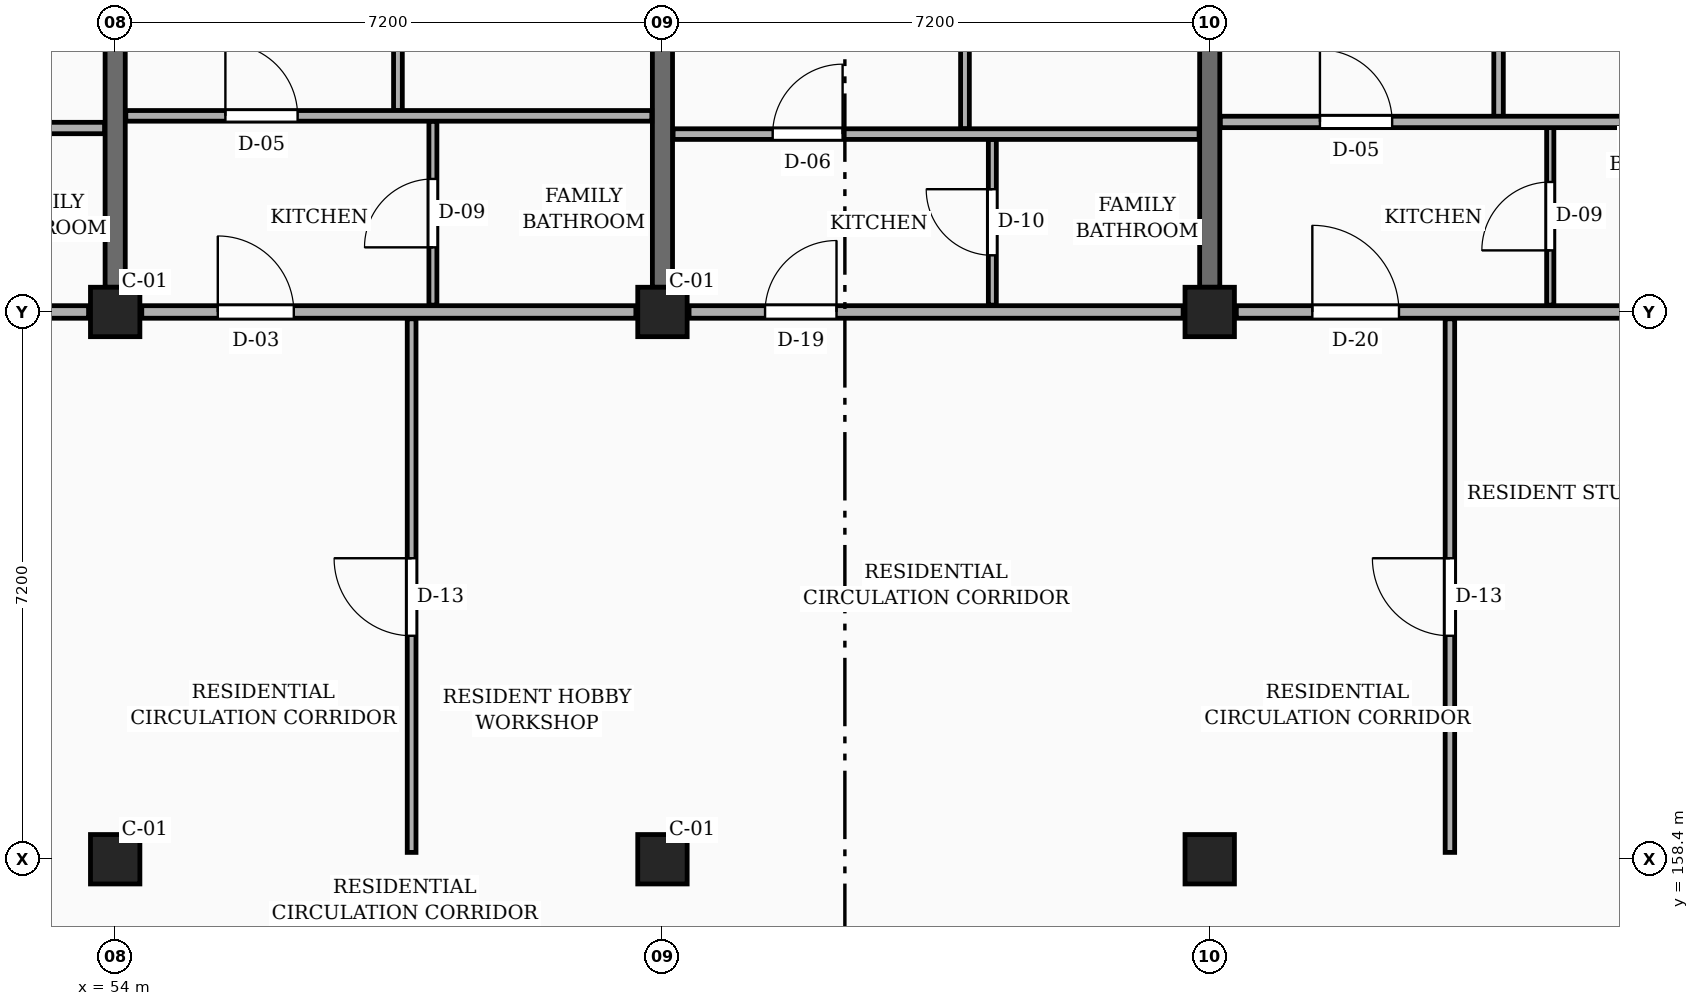
"""IFC4 building model, lengths in metres.
Left out: names, types, materials, properties, quantities, classifications, styles, units other than length and angle.
Written with IfcOpenShell. Run it as: python <this file> out.ifc"""

import sys

from ifc_helpers import new_model, si_unit, direction, frame, frame_2d, origin, origin_2d, place, context, subcontext, project, spatial, rectangle, extrude, element, fill, save


model = new_model("IFC4")
c1 = context("Model", 3, precision=1e-05, world=origin(), true_north=direction((0.0, 1.0)))
c2 = subcontext(c1, "Body", "Model", "MODEL_VIEW")
j1 = project(units=[si_unit("LENGTHUNIT", "METRE"), si_unit("PLANEANGLEUNIT", "RADIAN")], contexts=[c1])
p1 = place(None, origin())
s1 = spatial("IfcSite", under=j1, at=p1, CompositionType="ELEMENT")
p2 = place(p1, origin())
s2 = spatial("IfcBuilding", under=s1, at=p2, CompositionType="ELEMENT")
p3 = place(p2, frame((0.0, 0.0, 4.5)))
s3 = spatial("IfcBuildingStorey", under=s2, at=p3, CompositionType="ELEMENT", Elevation=4.5)
for number, where, z_axis, x_axis in (
    (1, (54.0, 158.4, 0.0), (0.0, 0.0, 1.0), (1.0, 0.0, 0.0)),
    (2, (54.0, 165.6, 0.0), (0.0, 0.0, 1.0), (1.0, 0.0, 0.0)),
    (3, (61.2, 158.4, 0.0), (0.0, 0.0, 1.0), (1.0, 0.0, 0.0)),
    (4, (61.2, 165.6, 0.0), (0.0, 0.0, 1.0), (1.0, 0.0, 0.0)),
    (5, (68.4, 158.4, 0.0), (0.0, 0.0, 1.0), (1.0, 0.0, 0.0)),
    (6, (68.4, 165.6, 0.0), (0.0, 0.0, 1.0), (1.0, 0.0, 0.0)),
):
    element("IfcColumn", number, at=place(p3, frame(where, z_axis=z_axis, x_axis=x_axis)), inside=s3, PredefinedType="COLUMN", context=c2, shape_type="SweptSolid", body=[
        extrude(rectangle(XDim=0.65, YDim=0.65, at=origin_2d()), origin(), (0.0, 0.0, 1.0), 3.15),
    ])
for number, where, z_axis, x_axis in (
    (7, (54.0, 165.925, 0.0), (0.0, 0.0, 1.0), (0.0, 1.0, 0.0)),
    (8, (61.2, 165.925, 0.0), (0.0, 0.0, 1.0), (0.0, 1.0, 0.0)),
    (9, (68.4, 165.925, 0.0), (0.0, 0.0, 1.0), (0.0, 1.0, 0.0)),
):
    element("IfcWall", number, at=place(p3, frame(where, z_axis=z_axis, x_axis=x_axis)), inside=s3, PredefinedType="SOLIDWALL", context=c2, shape_type="SweptSolid", body=[
        extrude(rectangle(XDim=6.575, YDim=0.265, at=frame_2d((3.288, 0.0))), origin(), (0.0, 0.0, 1.0), 2.185),
    ])
p4 = place(p3, frame((47.15, 165.6, 0.0), z_axis=(0.0, 0.0, 1.0), x_axis=(1.0, 0.0, 0.0)))
e10 = element("IfcWall", 10, at=p4, inside=s3, PredefinedType="PARTITIONING", context=c2, shape_type="SweptSolid", body=[
    extrude(rectangle(XDim=6.5, YDim=0.165, at=frame_2d((3.25, 0.0))), origin(), (0.0, 0.0, 1.0), 2.185),
])
p5 = place(p4, frame((1.0, 0.0, 0.0)))
e11 = element("IfcOpeningElement", 11, at=p5, cuts=e10, PredefinedType="OPENING", context=c2, shape_type="SweptSolid", body=[
    extrude(rectangle(XDim=1.14, YDim=2.18, at=frame_2d((0.57, 1.09))), frame((0.0, 0.093, 0.0), z_axis=(0.0, -1.0, 0.0), x_axis=(1.0, 0.0, 0.0)), (0.0, 0.0, 1.0), 0.185),
])
p6 = place(p3, frame((54.35, 165.6, 0.0), z_axis=(0.0, 0.0, 1.0), x_axis=(1.0, 0.0, 0.0)))
e12 = element("IfcWall", 12, at=p6, inside=s3, PredefinedType="PARTITIONING", context=c2, shape_type="SweptSolid", body=[
    extrude(rectangle(XDim=6.5, YDim=0.165, at=frame_2d((3.25, 0.0))), origin(), (0.0, 0.0, 1.0), 2.185),
])
p7 = place(p6, frame((1.0, 0.0, 0.0)))
e13 = element("IfcOpeningElement", 13, at=p7, cuts=e12, PredefinedType="OPENING", context=c2, shape_type="SweptSolid", body=[
    extrude(rectangle(XDim=1.0, YDim=2.15, at=frame_2d((0.5, 1.075))), frame((0.0, 0.093, 0.0), z_axis=(0.0, -1.0, 0.0), x_axis=(1.0, 0.0, 0.0)), (0.0, 0.0, 1.0), 0.185),
])
p8 = place(p3, frame((61.55, 165.6, 0.0), z_axis=(0.0, 0.0, 1.0), x_axis=(1.0, 0.0, 0.0)))
e14 = element("IfcWall", 14, at=p8, inside=s3, PredefinedType="PARTITIONING", context=c2, shape_type="SweptSolid", body=[
    extrude(rectangle(XDim=6.5, YDim=0.165, at=frame_2d((3.25, 0.0))), origin(), (0.0, 0.0, 1.0), 2.185),
])
p9 = place(p8, frame((1.0, 0.0, 0.0)))
e15 = element("IfcOpeningElement", 15, at=p9, cuts=e14, PredefinedType="OPENING", context=c2, shape_type="SweptSolid", body=[
    extrude(rectangle(XDim=0.94, YDim=2.12, at=frame_2d((0.47, 1.06))), frame((0.0, 0.093, 0.0), z_axis=(0.0, -1.0, 0.0), x_axis=(1.0, 0.0, 0.0)), (0.0, 0.0, 1.0), 0.185),
])
p10 = place(p3, frame((68.75, 165.6, 0.0), z_axis=(0.0, 0.0, 1.0), x_axis=(1.0, 0.0, 0.0)))
e16 = element("IfcWall", 16, at=p10, inside=s3, PredefinedType="PARTITIONING", context=c2, shape_type="SweptSolid", body=[
    extrude(rectangle(XDim=6.5, YDim=0.165, at=frame_2d((3.25, 0.0))), origin(), (0.0, 0.0, 1.0), 2.185),
])
p11 = place(p10, frame((1.0, 0.0, 0.0)))
e17 = element("IfcOpeningElement", 17, at=p11, cuts=e16, PredefinedType="OPENING", context=c2, shape_type="SweptSolid", body=[
    extrude(rectangle(XDim=1.14, YDim=2.18, at=frame_2d((0.57, 1.09))), frame((0.0, 0.093, 0.0), z_axis=(0.0, -1.0, 0.0), x_axis=(1.0, 0.0, 0.0)), (0.0, 0.0, 1.0), 0.185),
])
p12 = place(p3, frame((46.94, 168.02, 0.0), z_axis=(0.0, 0.0, 1.0), x_axis=(1.0, 0.0, 0.0)))
e18 = element("IfcWall", 18, at=p12, inside=s3, PredefinedType="PARTITIONING", context=c2, shape_type="SweptSolid", body=[
    extrude(rectangle(XDim=6.92, YDim=0.15, at=frame_2d((3.46, 0.0))), origin(), (0.0, 0.0, 1.0), 2.32),
])
p13 = place(p12, frame((1.31, 0.0, 0.0)))
e19 = element("IfcOpeningElement", 19, at=p13, cuts=e18, PredefinedType="OPENING", context=c2, shape_type="SweptSolid", body=[
    extrude(rectangle(XDim=0.92, YDim=2.1, at=frame_2d((0.46, 1.05))), frame((0.0, 0.085, 0.0), z_axis=(0.0, -1.0, 0.0), x_axis=(1.0, 0.0, 0.0)), (0.0, 0.0, 1.0), 0.17),
])
p14 = place(p3, frame((57.9, 158.49, 0.0), z_axis=(0.0, 0.0, 1.0), x_axis=(0.0, 1.0, 0.0)))
e20 = element("IfcWall", 20, at=p14, inside=s3, PredefinedType="PARTITIONING", context=c2, shape_type="SweptSolid", body=[
    extrude(rectangle(XDim=7.02, YDim=0.115, at=frame_2d((3.51, 0.0))), origin(), (0.0, 0.0, 1.0), 2.32),
])
p15 = place(p14, frame((2.85, 0.0, 0.0)))
e21 = element("IfcOpeningElement", 21, at=p15, cuts=e20, PredefinedType="OPENING", context=c2, shape_type="SweptSolid", body=[
    extrude(rectangle(XDim=1.02, YDim=2.15, at=frame_2d((0.51, 1.075))), frame((0.0, 0.067, 0.0), z_axis=(0.0, -1.0, 0.0), x_axis=(1.0, 0.0, 0.0)), (0.0, 0.0, 1.0), 0.135),
])
p16 = place(p3, frame((57.72, 168.25, 0.0), z_axis=(0.0, 0.0, 1.0), x_axis=(0.0, 1.0, 0.0)))
e22 = element("IfcWall", 22, at=p16, inside=s3, PredefinedType="PARTITIONING", context=c2, shape_type="SweptSolid", body=[
    extrude(rectangle(XDim=4.375, YDim=0.115, at=frame_2d((2.188, 0.0))), origin(), (0.0, 0.0, 1.0), 2.32),
])
p17 = place(p16, frame((1.738, 0.0, 0.0)))
e23 = element("IfcOpeningElement", 23, at=p17, cuts=e22, PredefinedType="OPENING", context=c2, shape_type="SweptSolid", body=[
    extrude(rectangle(XDim=0.9, YDim=2.1, at=frame_2d((0.45, 1.05))), frame((0.0, 0.067, 0.0), z_axis=(0.0, -1.0, 0.0), x_axis=(1.0, 0.0, 0.0)), (0.0, 0.0, 1.0), 0.135),
])
p18 = place(p3, frame((58.18, 165.69, 0.0), z_axis=(0.0, 0.0, 1.0), x_axis=(0.0, 1.0, 0.0)))
e24 = element("IfcWall", 24, at=p18, inside=s3, PredefinedType="PARTITIONING", context=c2, shape_type="SweptSolid", body=[
    extrude(rectangle(XDim=2.42, YDim=0.105, at=frame_2d((1.21, 0.0))), origin(), (0.0, 0.0, 1.0), 2.32),
])
p19 = place(p18, frame((0.76, 0.0, 0.0)))
e25 = element("IfcOpeningElement", 25, at=p19, cuts=e24, PredefinedType="OPENING", context=c2, shape_type="SweptSolid", body=[
    extrude(rectangle(XDim=0.9, YDim=2.05, at=frame_2d((0.45, 1.025))), frame((0.0, 0.062, 0.0), z_axis=(0.0, -1.0, 0.0), x_axis=(1.0, 0.0, 0.0)), (0.0, 0.0, 1.0), 0.125),
])
p20 = place(p3, frame((54.14, 168.18, 0.0), z_axis=(0.0, 0.0, 1.0), x_axis=(1.0, 0.0, 0.0)))
e26 = element("IfcWall", 26, at=p20, inside=s3, PredefinedType="PARTITIONING", context=c2, shape_type="SweptSolid", body=[
    extrude(rectangle(XDim=6.92, YDim=0.14, at=frame_2d((3.46, 0.0))), origin(), (0.0, 0.0, 1.0), 2.32),
])
p21 = place(p20, frame((1.31, 0.0, 0.0)))
e27 = element("IfcOpeningElement", 27, at=p21, cuts=e26, PredefinedType="OPENING", context=c2, shape_type="SweptSolid", body=[
    extrude(rectangle(XDim=0.95, YDim=2.1, at=frame_2d((0.475, 1.05))), frame((0.0, 0.08, 0.0), z_axis=(0.0, -1.0, 0.0), x_axis=(1.0, 0.0, 0.0)), (0.0, 0.0, 1.0), 0.16),
])
p22 = place(p3, frame((65.18, 168.01, 0.0), z_axis=(0.0, 0.0, 1.0), x_axis=(0.0, 1.0, 0.0)))
e28 = element("IfcWall", 28, at=p22, inside=s3, PredefinedType="PARTITIONING", context=c2, shape_type="SweptSolid", body=[
    extrude(rectangle(XDim=4.615, YDim=0.115, at=frame_2d((2.308, 0.0))), origin(), (0.0, 0.0, 1.0), 2.32),
])
p23 = place(p22, frame((1.867, 0.0, 0.0)))
e29 = element("IfcOpeningElement", 29, at=p23, cuts=e28, PredefinedType="OPENING", context=c2, shape_type="SweptSolid", body=[
    extrude(rectangle(XDim=0.88, YDim=2.08, at=frame_2d((0.44, 1.04))), frame((0.0, 0.067, 0.0), z_axis=(0.0, -1.0, 0.0), x_axis=(1.0, 0.0, 0.0)), (0.0, 0.0, 1.0), 0.135),
])
p24 = place(p3, frame((65.54, 165.69, 0.0), z_axis=(0.0, 0.0, 1.0), x_axis=(0.0, 1.0, 0.0)))
e30 = element("IfcWall", 30, at=p24, inside=s3, PredefinedType="PARTITIONING", context=c2, shape_type="SweptSolid", body=[
    extrude(rectangle(XDim=2.18, YDim=0.105, at=frame_2d((1.09, 0.0))), origin(), (0.0, 0.0, 1.0), 2.32),
])
p25 = place(p24, frame((0.655, 0.0, 0.0)))
e31 = element("IfcOpeningElement", 31, at=p25, cuts=e30, PredefinedType="OPENING", context=c2, shape_type="SweptSolid", body=[
    extrude(rectangle(XDim=0.87, YDim=2.05, at=frame_2d((0.435, 1.025))), frame((0.0, 0.062, 0.0), z_axis=(0.0, -1.0, 0.0), x_axis=(1.0, 0.0, 0.0)), (0.0, 0.0, 1.0), 0.125),
])
p26 = place(p3, frame((61.34, 167.94, 0.0), z_axis=(0.0, 0.0, 1.0), x_axis=(1.0, 0.0, 0.0)))
e32 = element("IfcWall", 32, at=p26, inside=s3, PredefinedType="PARTITIONING", context=c2, shape_type="SweptSolid", body=[
    extrude(rectangle(XDim=6.92, YDim=0.14, at=frame_2d((3.46, 0.0))), origin(), (0.0, 0.0, 1.0), 2.32),
])
p27 = place(p26, frame((1.31, 0.0, 0.0)))
e33 = element("IfcOpeningElement", 33, at=p27, cuts=e32, PredefinedType="OPENING", context=c2, shape_type="SweptSolid", body=[
    extrude(rectangle(XDim=0.92, YDim=2.1, at=frame_2d((0.46, 1.05))), frame((0.0, 0.08, 0.0), z_axis=(0.0, -1.0, 0.0), x_axis=(1.0, 0.0, 0.0)), (0.0, 0.0, 1.0), 0.16),
])
p28 = place(p3, frame((71.56, 158.49, 0.0), z_axis=(0.0, 0.0, 1.0), x_axis=(0.0, 1.0, 0.0)))
e34 = element("IfcWall", 34, at=p28, inside=s3, PredefinedType="PARTITIONING", context=c2, shape_type="SweptSolid", body=[
    extrude(rectangle(XDim=7.02, YDim=0.125, at=frame_2d((3.51, 0.0))), origin(), (0.0, 0.0, 1.0), 2.32),
])
p29 = place(p28, frame((2.85, 0.0, 0.0)))
e35 = element("IfcOpeningElement", 35, at=p29, cuts=e34, PredefinedType="OPENING", context=c2, shape_type="SweptSolid", body=[
    extrude(rectangle(XDim=1.02, YDim=2.15, at=frame_2d((0.51, 1.075))), frame((0.0, 0.073, 0.0), z_axis=(0.0, -1.0, 0.0), x_axis=(1.0, 0.0, 0.0)), (0.0, 0.0, 1.0), 0.145),
])
p30 = place(p3, frame((72.2, 168.17, 0.0), z_axis=(0.0, 0.0, 1.0), x_axis=(0.0, 1.0, 0.0)))
e36 = element("IfcWall", 36, at=p30, inside=s3, PredefinedType="PARTITIONING", context=c2, shape_type="SweptSolid", body=[
    extrude(rectangle(XDim=4.455, YDim=0.125, at=frame_2d((2.228, 0.0))), origin(), (0.0, 0.0, 1.0), 2.32),
])
p31 = place(p30, frame((1.778, 0.0, 0.0)))
e37 = element("IfcOpeningElement", 37, at=p31, cuts=e36, PredefinedType="OPENING", context=c2, shape_type="SweptSolid", body=[
    extrude(rectangle(XDim=0.9, YDim=2.1, at=frame_2d((0.45, 1.05))), frame((0.0, 0.073, 0.0), z_axis=(0.0, -1.0, 0.0), x_axis=(1.0, 0.0, 0.0)), (0.0, 0.0, 1.0), 0.145),
])
p32 = place(p3, frame((72.88, 165.69, 0.0), z_axis=(0.0, 0.0, 1.0), x_axis=(0.0, 1.0, 0.0)))
e38 = element("IfcWall", 38, at=p32, inside=s3, PredefinedType="PARTITIONING", context=c2, shape_type="SweptSolid", body=[
    extrude(rectangle(XDim=2.34, YDim=0.095, at=frame_2d((1.17, 0.0))), origin(), (0.0, 0.0, 1.0), 2.32),
])
p33 = place(p32, frame((0.72, 0.0, 0.0)))
e39 = element("IfcOpeningElement", 39, at=p33, cuts=e38, PredefinedType="OPENING", context=c2, shape_type="SweptSolid", body=[
    extrude(rectangle(XDim=0.9, YDim=2.05, at=frame_2d((0.45, 1.025))), frame((0.0, 0.058, 0.0), z_axis=(0.0, -1.0, 0.0), x_axis=(1.0, 0.0, 0.0)), (0.0, 0.0, 1.0), 0.115),
])
p34 = place(p3, frame((68.54, 168.1, 0.0), z_axis=(0.0, 0.0, 1.0), x_axis=(1.0, 0.0, 0.0)))
e40 = element("IfcWall", 40, at=p34, inside=s3, PredefinedType="PARTITIONING", context=c2, shape_type="SweptSolid", body=[
    extrude(rectangle(XDim=6.885, YDim=0.15, at=frame_2d((3.442, 0.0))), origin(), (0.0, 0.0, 1.0), 2.32),
])
p35 = place(p34, frame((1.31, 0.0, 0.0)))
e41 = element("IfcOpeningElement", 41, at=p35, cuts=e40, PredefinedType="OPENING", context=c2, shape_type="SweptSolid", body=[
    extrude(rectangle(XDim=0.95, YDim=2.1, at=frame_2d((0.475, 1.05))), frame((0.0, 0.085, 0.0), z_axis=(0.0, -1.0, 0.0), x_axis=(1.0, 0.0, 0.0)), (0.0, 0.0, 1.0), 0.17),
])
p36 = place(p7, origin())
e42 = element("IfcDoor", 42, at=p36, inside=s3, OperationType="SINGLE_SWING_LEFT", PredefinedType="DOOR", context=c2, shape_type="SweptSolid", body=[
    extrude(rectangle(XDim=1.0, YDim=2.15, at=frame_2d((0.5, 1.075))), frame((0.0, 0.025, 0.0), z_axis=(0.0, -1.0, 0.0), x_axis=(1.0, 0.0, 0.0)), (0.0, 0.0, 1.0), 0.05),
])
fill(e13, e42)
p37 = place(p9, origin())
e43 = element("IfcDoor", 43, at=p37, inside=s3, OperationType="SINGLE_SWING_RIGHT", PredefinedType="DOOR", context=c2, shape_type="SweptSolid", body=[
    extrude(rectangle(XDim=0.94, YDim=2.12, at=frame_2d((0.47, 1.06))), frame((0.0, 0.025, 0.0), z_axis=(0.0, -1.0, 0.0), x_axis=(1.0, 0.0, 0.0)), (0.0, 0.0, 1.0), 0.05),
])
fill(e15, e43)
p38 = place(p11, origin())
e44 = element("IfcDoor", 44, at=p38, inside=s3, OperationType="SINGLE_SWING_LEFT", PredefinedType="DOOR", context=c2, shape_type="SweptSolid", body=[
    extrude(rectangle(XDim=1.14, YDim=2.18, at=frame_2d((0.57, 1.09))), frame((0.0, 0.025, 0.0), z_axis=(0.0, -1.0, 0.0), x_axis=(1.0, 0.0, 0.0)), (0.0, 0.0, 1.0), 0.05),
])
fill(e17, e44)
p39 = place(p15, origin())
e45 = element("IfcDoor", 45, at=p39, inside=s3, OperationType="SINGLE_SWING_RIGHT", PredefinedType="DOOR", context=c2, shape_type="SweptSolid", body=[
    extrude(rectangle(XDim=1.02, YDim=2.15, at=frame_2d((0.51, 1.075))), frame((0.0, 0.025, 0.0), z_axis=(0.0, -1.0, 0.0), x_axis=(1.0, 0.0, 0.0)), (0.0, 0.0, 1.0), 0.05),
])
fill(e21, e45)
p40 = place(p19, origin())
e46 = element("IfcDoor", 46, at=p40, inside=s3, OperationType="SINGLE_SWING_LEFT", PredefinedType="DOOR", context=c2, shape_type="SweptSolid", body=[
    extrude(rectangle(XDim=0.9, YDim=2.05, at=frame_2d((0.45, 1.025))), frame((0.0, 0.025, 0.0), z_axis=(0.0, -1.0, 0.0), x_axis=(1.0, 0.0, 0.0)), (0.0, 0.0, 1.0), 0.05),
])
fill(e25, e46)
p41 = place(p21, origin())
e47 = element("IfcDoor", 47, at=p41, inside=s3, OperationType="SINGLE_SWING_LEFT", PredefinedType="DOOR", context=c2, shape_type="SweptSolid", body=[
    extrude(rectangle(XDim=0.95, YDim=2.1, at=frame_2d((0.475, 1.05))), frame((0.0, 0.025, 0.0), z_axis=(0.0, -1.0, 0.0), x_axis=(1.0, 0.0, 0.0)), (0.0, 0.0, 1.0), 0.05),
])
fill(e27, e47)
p42 = place(p25, origin())
e48 = element("IfcDoor", 48, at=p42, inside=s3, OperationType="SINGLE_SWING_RIGHT", PredefinedType="DOOR", context=c2, shape_type="SweptSolid", body=[
    extrude(rectangle(XDim=0.87, YDim=2.05, at=frame_2d((0.435, 1.025))), frame((0.0, 0.025, 0.0), z_axis=(0.0, -1.0, 0.0), x_axis=(1.0, 0.0, 0.0)), (0.0, 0.0, 1.0), 0.05),
])
fill(e31, e48)
p43 = place(p27, origin())
e49 = element("IfcDoor", 49, at=p43, inside=s3, OperationType="SINGLE_SWING_RIGHT", PredefinedType="DOOR", context=c2, shape_type="SweptSolid", body=[
    extrude(rectangle(XDim=0.92, YDim=2.1, at=frame_2d((0.46, 1.05))), frame((0.0, 0.025, 0.0), z_axis=(0.0, -1.0, 0.0), x_axis=(1.0, 0.0, 0.0)), (0.0, 0.0, 1.0), 0.05),
])
fill(e33, e49)
p44 = place(p29, origin())
e50 = element("IfcDoor", 50, at=p44, inside=s3, OperationType="SINGLE_SWING_RIGHT", PredefinedType="DOOR", context=c2, shape_type="SweptSolid", body=[
    extrude(rectangle(XDim=1.02, YDim=2.15, at=frame_2d((0.51, 1.075))), frame((0.0, 0.025, 0.0), z_axis=(0.0, -1.0, 0.0), x_axis=(1.0, 0.0, 0.0)), (0.0, 0.0, 1.0), 0.05),
])
fill(e35, e50)
p45 = place(p33, origin())
e51 = element("IfcDoor", 51, at=p45, inside=s3, OperationType="SINGLE_SWING_LEFT", PredefinedType="DOOR", context=c2, shape_type="SweptSolid", body=[
    extrude(rectangle(XDim=0.9, YDim=2.05, at=frame_2d((0.45, 1.025))), frame((0.0, 0.025, 0.0), z_axis=(0.0, -1.0, 0.0), x_axis=(1.0, 0.0, 0.0)), (0.0, 0.0, 1.0), 0.05),
])
fill(e39, e51)
p46 = place(p35, origin())
e52 = element("IfcDoor", 52, at=p46, inside=s3, OperationType="SINGLE_SWING_LEFT", PredefinedType="DOOR", context=c2, shape_type="SweptSolid", body=[
    extrude(rectangle(XDim=0.95, YDim=2.1, at=frame_2d((0.475, 1.05))), frame((0.0, 0.025, 0.0), z_axis=(0.0, -1.0, 0.0), x_axis=(1.0, 0.0, 0.0)), (0.0, 0.0, 1.0), 0.05),
])
fill(e41, e52)
save(model, sys.argv[1])
